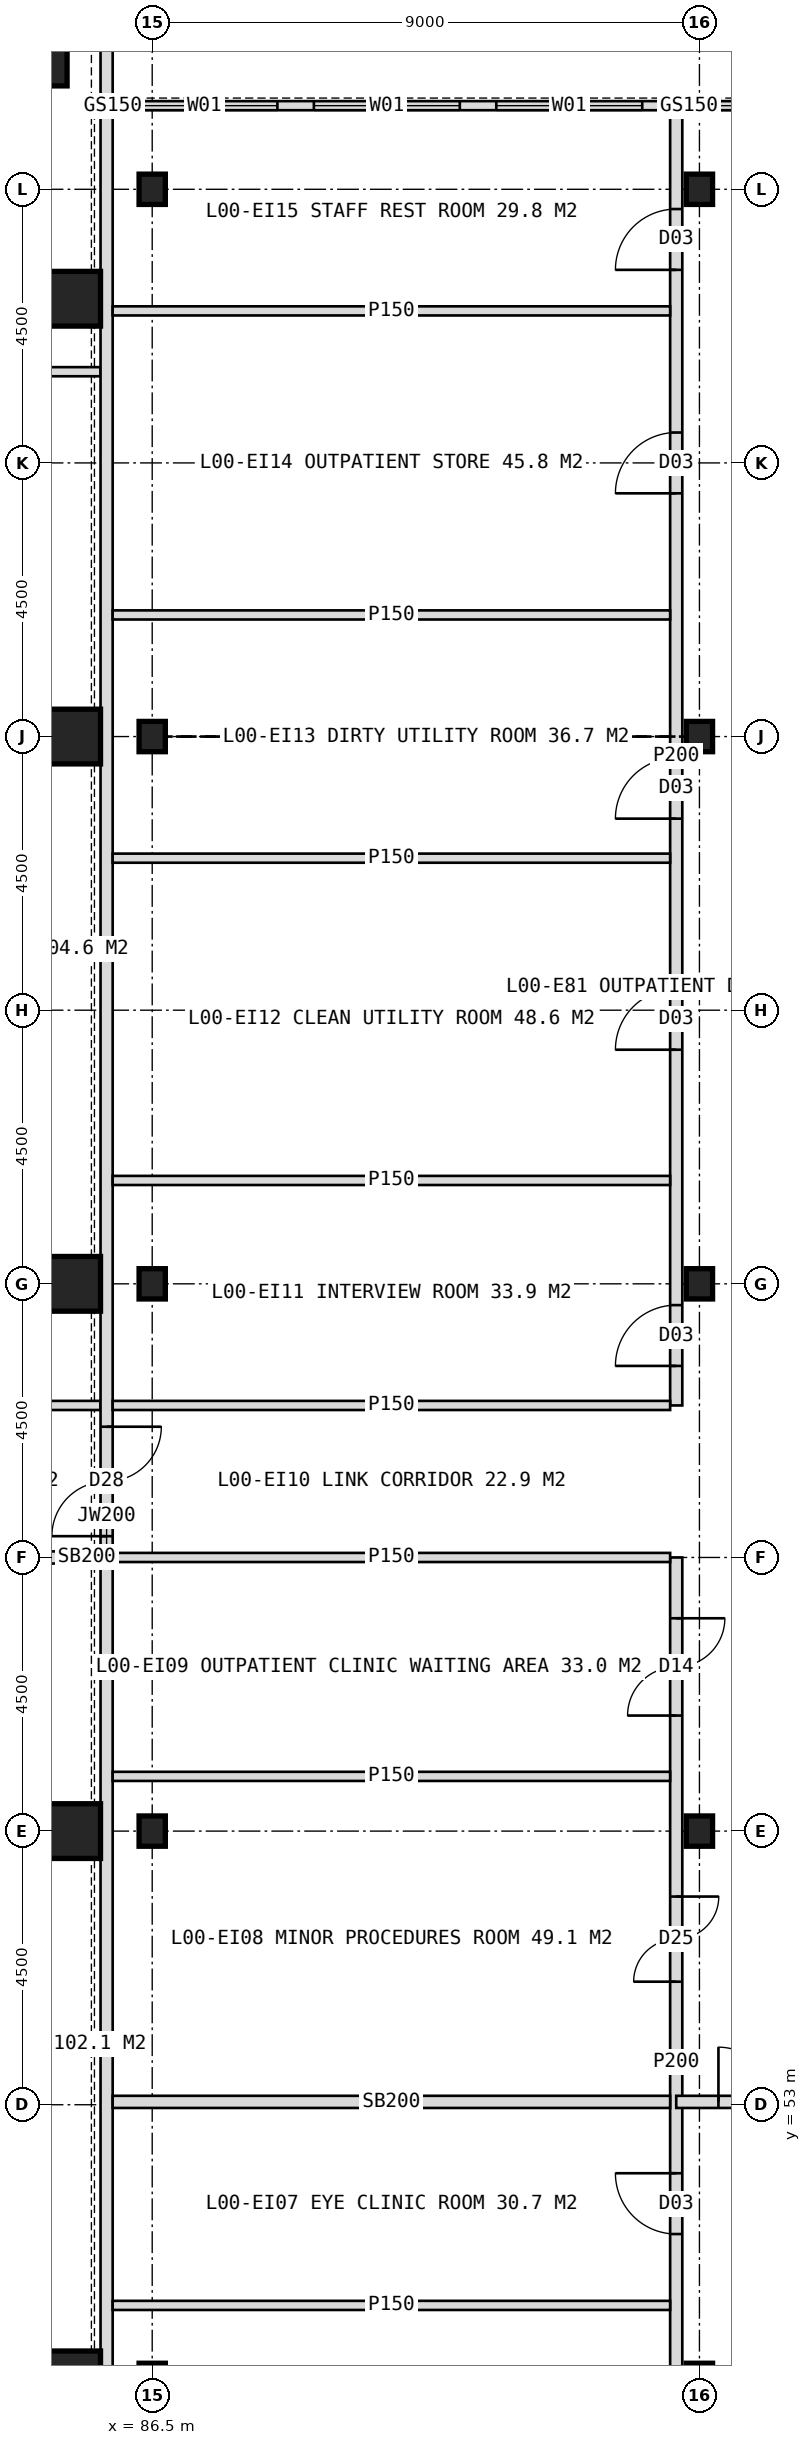
"""IFC4 building model, lengths in metres.
Left out: names, types, materials, properties, quantities, classifications, styles, units other than length and angle.
Written with IfcOpenShell. Run it as: python <this file> out.ifc"""

import sys

from ifc_helpers import new_model, si_unit, direction, frame, frame_2d, origin, origin_2d, place, context, subcontext, project, spatial, rectangle, hollow_rectangle, i_section, extrude, element, fill, save


model = new_model("IFC4")
c1 = context("Model", 3, precision=1e-05, world=origin(), true_north=direction((0.0, 1.0)))
c2 = subcontext(c1, "Body", "Model", "MODEL_VIEW")
j1 = project(units=[si_unit("LENGTHUNIT", "METRE"), si_unit("PLANEANGLEUNIT", "RADIAN")], contexts=[c1])
p1 = place(None, origin())
s1 = spatial("IfcSite", under=j1, at=p1, CompositionType="ELEMENT")
p2 = place(p1, origin())
s2 = spatial("IfcBuilding", under=s1, at=p2, CompositionType="ELEMENT")
p3 = place(p2, origin())
s3 = spatial("IfcBuildingStorey", under=s2, at=p3, CompositionType="ELEMENT", Elevation=0.0)
for number, where, z_axis, x_axis in (
    (1, (85.2, 48.5, 0.0), (0.0, 0.0, 1.0), (1.0, 0.0, 0.0)),
    (2, (85.2, 57.5, 0.0), (0.0, 0.0, 1.0), (1.0, 0.0, 0.0)),
    (3, (85.2, 66.5, 0.0), (0.0, 0.0, 1.0), (1.0, 0.0, 0.0)),
    (4, (85.2, 75.5, 0.0), (0.0, 0.0, 1.0), (1.0, 0.0, 0.0)),
    (5, (85.2, 82.7, 0.0), (0.0, 0.0, 1.0), (1.0, 0.0, 0.0)),
    (6, (84.65, 86.65, 0.0), (0.0, 0.0, 1.0), (1.0, 0.0, 0.0)),
):
    element("IfcColumn", number, at=place(p3, frame(where, z_axis=z_axis, x_axis=x_axis)), inside=s3, PredefinedType="COLUMN", context=c2, shape_type="SweptSolid", body=[
        extrude(hollow_rectangle(XDim=0.9, YDim=0.9, WallThickness=0.08, at=origin_2d()), origin(), (0.0, 0.0, 1.0), 6.0),
    ])
for number, where, z_axis, x_axis in (
    (7, (86.5, 48.5, 0.0), (0.0, 0.0, 1.0), (1.0, 0.0, 0.0)),
    (8, (86.5, 57.5, 0.0), (0.0, 0.0, 1.0), (1.0, 0.0, 0.0)),
    (9, (86.5, 66.5, 0.0), (0.0, 0.0, 1.0), (1.0, 0.0, 0.0)),
    (10, (86.5, 75.5, 0.0), (0.0, 0.0, 1.0), (1.0, 0.0, 0.0)),
    (11, (86.5, 84.5, 0.0), (0.0, 0.0, 1.0), (1.0, 0.0, 0.0)),
    (12, (95.5, 48.5, 0.0), (0.0, 0.0, 1.0), (1.0, 0.0, 0.0)),
    (13, (95.5, 57.5, 0.0), (0.0, 0.0, 1.0), (1.0, 0.0, 0.0)),
    (14, (95.5, 66.5, 0.0), (0.0, 0.0, 1.0), (1.0, 0.0, 0.0)),
    (15, (95.5, 75.5, 0.0), (0.0, 0.0, 1.0), (1.0, 0.0, 0.0)),
    (16, (95.5, 84.5, 0.0), (0.0, 0.0, 1.0), (1.0, 0.0, 0.0)),
):
    element("IfcColumn", number, at=place(p3, frame(where, z_axis=z_axis, x_axis=x_axis)), inside=s3, PredefinedType="COLUMN", context=c2, shape_type="SweptSolid", body=[
        extrude(i_section(OverallWidth=0.432, OverallDepth=0.498, WebThickness=0.056, FlangeThickness=0.089, FilletRadius=0.015, at=origin_2d()), origin(), (0.0, 0.0, 1.0), 6.0),
    ])
p4 = place(p3, frame((104.5, 85.875, 0.0), z_axis=(0.0, 0.0, 1.0), x_axis=(-1.0, 0.0, 0.0)))
e17 = element("IfcWall", 17, at=p4, inside=s3, PredefinedType="STANDARD", context=c2, shape_type="SweptSolid", body=[
    extrude(rectangle(XDim=18.341, YDim=0.15, at=frame_2d((9.17, 0.0))), origin(), (0.0, 0.0, 1.0), 5.1),
])
p5 = place(p4, frame((3.645, 0.0, 0.0)))
e18 = element("IfcOpeningElement", 18, at=p5, cuts=e17, PredefinedType="OPENING", context=c2, shape_type="SweptSolid", body=[
    extrude(rectangle(XDim=1.8, YDim=2.4, at=frame_2d((0.9, 1.2))), frame((0.0, 0.085, 0.0), z_axis=(0.0, -1.0, 0.0), x_axis=(1.0, 0.0, 0.0)), (0.0, 0.0, 1.0), 0.17),
])
p6 = place(p4, frame((0.152, 0.0, 0.6)))
e19 = element("IfcOpeningElement", 19, at=p6, cuts=e17, PredefinedType="OPENING", context=c2, shape_type="SweptSolid", body=[
    extrude(rectangle(XDim=2.4, YDim=3.0, at=frame_2d((1.2, 1.5))), frame((0.0, 0.085, 0.0), z_axis=(0.0, -1.0, 0.0), x_axis=(1.0, 0.0, 0.0)), (0.0, 0.0, 1.0), 0.17),
])
p7 = place(p4, frame((6.587, 0.0, 0.6)))
e20 = element("IfcOpeningElement", 20, at=p7, cuts=e17, PredefinedType="OPENING", context=c2, shape_type="SweptSolid", body=[
    extrude(rectangle(XDim=2.4, YDim=3.0, at=frame_2d((1.2, 1.5))), frame((0.0, 0.085, 0.0), z_axis=(0.0, -1.0, 0.0), x_axis=(1.0, 0.0, 0.0)), (0.0, 0.0, 1.0), 0.17),
])
p8 = place(p4, frame((9.941, 0.0, 0.6)))
e21 = element("IfcOpeningElement", 21, at=p8, cuts=e17, PredefinedType="OPENING", context=c2, shape_type="SweptSolid", body=[
    extrude(rectangle(XDim=2.4, YDim=3.0, at=frame_2d((1.2, 1.5))), frame((0.0, 0.085, 0.0), z_axis=(0.0, -1.0, 0.0), x_axis=(1.0, 0.0, 0.0)), (0.0, 0.0, 1.0), 0.17),
])
p9 = place(p4, frame((12.941, 0.0, 0.6)))
e22 = element("IfcOpeningElement", 22, at=p9, cuts=e17, PredefinedType="OPENING", context=c2, shape_type="SweptSolid", body=[
    extrude(rectangle(XDim=2.4, YDim=3.0, at=frame_2d((1.2, 1.5))), frame((0.0, 0.085, 0.0), z_axis=(0.0, -1.0, 0.0), x_axis=(1.0, 0.0, 0.0)), (0.0, 0.0, 1.0), 0.17),
])
p10 = place(p4, frame((15.941, 0.0, 0.6)))
e23 = element("IfcOpeningElement", 23, at=p10, cuts=e17, PredefinedType="OPENING", context=c2, shape_type="SweptSolid", body=[
    extrude(rectangle(XDim=2.4, YDim=3.0, at=frame_2d((1.2, 1.5))), frame((0.0, 0.085, 0.0), z_axis=(0.0, -1.0, 0.0), x_axis=(1.0, 0.0, 0.0)), (0.0, 0.0, 1.0), 0.17),
])
p11 = place(p3, frame((86.159, 85.875, 0.0), z_axis=(0.0, 0.0, 1.0), x_axis=(-1.0, 0.0, 0.0)))
e24 = element("IfcWall", 24, at=p11, inside=s3, PredefinedType="STANDARD", context=c2, shape_type="SweptSolid", body=[
    extrude(rectangle(XDim=0.609, YDim=0.15, at=frame_2d((0.304, 0.0))), origin(), (0.0, 0.0, 1.0), 6.0),
])
for number, where, z_axis, x_axis in (
    (25, (79.5, 81.5, 0.0), (0.0, 0.0, 1.0), (1.0, 0.0, 0.0)),
    (26, (79.5, 64.5, 0.0), (0.0, 0.0, 1.0), (1.0, 0.0, 0.0)),
):
    element("IfcWall", number, at=place(p3, frame(where, z_axis=z_axis, x_axis=x_axis)), inside=s3, PredefinedType="PARTITIONING", context=c2, shape_type="SweptSolid", body=[
        extrude(rectangle(XDim=6.15, YDim=0.15, at=frame_2d((3.075, 0.0))), origin(), (0.0, 0.0, 1.0), 5.7),
    ])
p12 = place(p3, frame((79.5, 62.0, 0.0), z_axis=(0.0, 0.0, 1.0), x_axis=(1.0, 0.0, 0.0)))
e27 = element("IfcWall", 27, at=p12, inside=s3, PredefinedType="SOLIDWALL", context=c2, shape_type="SweptSolid", body=[
    extrude(rectangle(XDim=5.7, YDim=0.2, at=frame_2d((2.85, 0.0))), origin(), (0.0, 0.0, 1.0), 4.9),
])
p13 = place(p3, frame((85.2, 62.0, 0.0), z_axis=(0.0, 0.0, 1.0), x_axis=(1.0, 0.0, 0.0)))
e28 = element("IfcWall", 28, at=p13, inside=s3, PredefinedType="SOLIDWALL", context=c2, shape_type="SweptSolid", body=[
    extrude(rectangle(XDim=0.45, YDim=0.2, at=frame_2d((0.225, 0.0))), origin(), (0.0, 0.0, 1.0), 5.7),
])
p14 = place(p3, frame((95.118, 45.4, 0.0), z_axis=(0.0, 0.0, 1.0), x_axis=(0.0, 1.0, 0.0)))
e29 = element("IfcWall", 29, at=p14, inside=s3, PredefinedType="PARTITIONING", context=c2, shape_type="SweptSolid", body=[
    extrude(rectangle(XDim=16.6, YDim=0.2, at=frame_2d((8.3, 0.0))), origin(), (0.0, 0.0, 1.0), 5.7),
])
p15 = place(p14, frame((1.65, 0.0, 0.0)))
e30 = element("IfcOpeningElement", 30, at=p15, cuts=e29, PredefinedType="OPENING", context=c2, shape_type="SweptSolid", body=[
    extrude(rectangle(XDim=1.0, YDim=2.1, at=frame_2d((0.5, 1.05))), frame((0.0, 0.11, 0.0), z_axis=(0.0, -1.0, 0.0), x_axis=(1.0, 0.0, 0.0)), (0.0, 0.0, 1.0), 0.22),
])
p16 = place(p14, frame((5.473, 0.0, 0.0)))
e31 = element("IfcOpeningElement", 31, at=p16, cuts=e29, PredefinedType="OPENING", context=c2, shape_type="SweptSolid", body=[
    extrude(rectangle(XDim=1.0, YDim=2.1, at=frame_2d((0.5, 1.05))), frame((0.0, 0.11, 0.0), z_axis=(0.0, -1.0, 0.0), x_axis=(1.0, 0.0, 0.0)), (0.0, 0.0, 1.0), 0.22),
])
p17 = place(p14, frame((9.624, 0.0, 0.0)))
e32 = element("IfcOpeningElement", 32, at=p17, cuts=e29, PredefinedType="OPENING", context=c2, shape_type="SweptSolid", body=[
    extrude(rectangle(XDim=1.4, YDim=2.2, at=frame_2d((0.7, 1.1))), frame((0.0, 0.11, 0.0), z_axis=(0.0, -1.0, 0.0), x_axis=(1.0, 0.0, 0.0)), (0.0, 0.0, 1.0), 0.22),
])
p18 = place(p14, frame((14.0, 0.0, 0.0)))
e33 = element("IfcOpeningElement", 33, at=p18, cuts=e29, PredefinedType="OPENING", context=c2, shape_type="SweptSolid", body=[
    extrude(rectangle(XDim=1.6, YDim=2.2, at=frame_2d((0.8, 1.1))), frame((0.0, 0.11, 0.0), z_axis=(0.0, -1.0, 0.0), x_axis=(1.0, 0.0, 0.0)), (0.0, 0.0, 1.0), 0.22),
])
p19 = place(p3, frame((95.118, 64.5, 0.0), z_axis=(0.0, 0.0, 1.0), x_axis=(0.0, 1.0, 0.0)))
e34 = element("IfcWall", 34, at=p19, inside=s3, PredefinedType="PARTITIONING", context=c2, shape_type="SweptSolid", body=[
    extrude(rectangle(XDim=21.35, YDim=0.2, at=frame_2d((10.675, 0.0))), origin(), (0.0, 0.0, 1.0), 5.7),
])
p20 = place(p19, frame((0.65, 0.0, 0.0)))
e35 = element("IfcOpeningElement", 35, at=p20, cuts=e34, PredefinedType="OPENING", context=c2, shape_type="SweptSolid", body=[
    extrude(rectangle(XDim=1.0, YDim=2.1, at=frame_2d((0.5, 1.05))), frame((0.0, 0.11, 0.0), z_axis=(0.0, -1.0, 0.0), x_axis=(1.0, 0.0, 0.0)), (0.0, 0.0, 1.0), 0.22),
])
p21 = place(p19, frame((5.85, 0.0, 0.0)))
e36 = element("IfcOpeningElement", 36, at=p21, cuts=e34, PredefinedType="OPENING", context=c2, shape_type="SweptSolid", body=[
    extrude(rectangle(XDim=1.0, YDim=2.1, at=frame_2d((0.5, 1.05))), frame((0.0, 0.11, 0.0), z_axis=(0.0, -1.0, 0.0), x_axis=(1.0, 0.0, 0.0)), (0.0, 0.0, 1.0), 0.22),
])
p22 = place(p19, frame((9.65, 0.0, 0.0)))
e37 = element("IfcOpeningElement", 37, at=p22, cuts=e34, PredefinedType="OPENING", context=c2, shape_type="SweptSolid", body=[
    extrude(rectangle(XDim=1.0, YDim=2.1, at=frame_2d((0.5, 1.05))), frame((0.0, 0.11, 0.0), z_axis=(0.0, -1.0, 0.0), x_axis=(1.0, 0.0, 0.0)), (0.0, 0.0, 1.0), 0.22),
])
p23 = place(p19, frame((15.0, 0.0, 0.0)))
e38 = element("IfcOpeningElement", 38, at=p23, cuts=e34, PredefinedType="OPENING", context=c2, shape_type="SweptSolid", body=[
    extrude(rectangle(XDim=1.0, YDim=2.1, at=frame_2d((0.5, 1.05))), frame((0.0, 0.11, 0.0), z_axis=(0.0, -1.0, 0.0), x_axis=(1.0, 0.0, 0.0)), (0.0, 0.0, 1.0), 0.22),
])
p24 = place(p19, frame((18.675, 0.0, 0.0)))
e39 = element("IfcOpeningElement", 39, at=p24, cuts=e34, PredefinedType="OPENING", context=c2, shape_type="SweptSolid", body=[
    extrude(rectangle(XDim=1.0, YDim=2.1, at=frame_2d((0.5, 1.05))), frame((0.0, 0.11, 0.0), z_axis=(0.0, -1.0, 0.0), x_axis=(1.0, 0.0, 0.0)), (0.0, 0.0, 1.0), 0.22),
])
p25 = place(p3, frame((98.307, 53.047, 0.0), z_axis=(0.0, 0.0, 1.0), x_axis=(-1.0, 0.0, 0.0)))
e40 = element("IfcWall", 40, at=p25, inside=s3, PredefinedType="SOLIDWALL", context=c2, shape_type="SweptSolid", body=[
    extrude(rectangle(XDim=3.189, YDim=0.2, at=frame_2d((1.594, 0.0))), origin(), (0.0, 0.0, 1.0), 5.7),
])
p26 = place(p25, frame((0.695, 0.0, 0.0)))
e41 = element("IfcOpeningElement", 41, at=p26, cuts=e40, PredefinedType="OPENING", context=c2, shape_type="SweptSolid", body=[
    extrude(rectangle(XDim=1.8, YDim=2.2, at=frame_2d((0.9, 1.1))), frame((0.0, 0.11, 0.0), z_axis=(0.0, -1.0, 0.0), x_axis=(1.0, 0.0, 0.0)), (0.0, 0.0, 1.0), 0.22),
])
p27 = place(p3, frame((85.75, 36.8, 0.0), z_axis=(0.0, 0.0, 1.0), x_axis=(0.0, 1.0, 0.0)))
e42 = element("IfcWall", 42, at=p27, inside=s3, PredefinedType="SOLIDWALL", context=c2, shape_type="SweptSolid", body=[
    extrude(rectangle(XDim=50.4, YDim=0.2, at=frame_2d((25.2, 0.0))), origin(), (0.0, 0.0, 1.0), 5.7),
])
p28 = place(p27, frame((6.25, 0.0, 0.0)))
e43 = element("IfcOpeningElement", 43, at=p28, cuts=e42, PredefinedType="OPENING", context=c2, shape_type="SweptSolid", body=[
    extrude(rectangle(XDim=1.8, YDim=2.2, at=frame_2d((0.9, 1.1))), frame((0.0, 0.11, 0.0), z_axis=(0.0, -1.0, 0.0), x_axis=(1.0, 0.0, 0.0)), (0.0, 0.0, 1.0), 0.22),
])
p29 = place(p27, frame((25.55, 0.0, 0.0)))
e44 = element("IfcOpeningElement", 44, at=p29, cuts=e42, PredefinedType="OPENING", context=c2, shape_type="SweptSolid", body=[
    extrude(rectangle(XDim=1.8, YDim=2.2, at=frame_2d((0.9, 1.1))), frame((0.0, 0.11, 0.0), z_axis=(0.0, -1.0, 0.0), x_axis=(1.0, 0.0, 0.0)), (0.0, 0.0, 1.0), 0.22),
])
p30 = place(p3, frame((95.018, 49.7, 0.0), z_axis=(0.0, 0.0, 1.0), x_axis=(-1.0, 0.0, 0.0)))
e45 = element("IfcWall", 45, at=p30, inside=s3, PredefinedType="PARTITIONING", context=c2, shape_type="SweptSolid", body=[
    extrude(rectangle(XDim=9.168, YDim=0.15, at=frame_2d((4.584, 0.0))), origin(), (0.0, 0.0, 1.0), 5.7),
])
p31 = place(p3, frame((95.018, 53.047, 0.0), z_axis=(0.0, 0.0, 1.0), x_axis=(-1.0, 0.0, 0.0)))
e46 = element("IfcWall", 46, at=p31, inside=s3, PredefinedType="SOLIDWALL", context=c2, shape_type="SweptSolid", body=[
    extrude(rectangle(XDim=9.168, YDim=0.2, at=frame_2d((4.584, 0.0))), origin(), (0.0, 0.0, 1.0), 5.7),
])
for number, where, z_axis, x_axis in (
    (47, (95.018, 58.4, 0.0), (0.0, 0.0, 1.0), (-1.0, 0.0, 0.0)),
    (48, (95.018, 62.0, 0.0), (0.0, 0.0, 1.0), (-1.0, 0.0, 0.0)),
    (49, (95.018, 64.5, 0.0), (0.0, 0.0, 1.0), (-1.0, 0.0, 0.0)),
    (50, (95.018, 68.2, 0.0), (0.0, 0.0, 1.0), (-1.0, 0.0, 0.0)),
    (51, (95.018, 73.5, 0.0), (0.0, 0.0, 1.0), (-1.0, 0.0, 0.0)),
    (52, (95.018, 77.5, 0.0), (0.0, 0.0, 1.0), (-1.0, 0.0, 0.0)),
    (53, (95.018, 82.5, 0.0), (0.0, 0.0, 1.0), (-1.0, 0.0, 0.0)),
):
    element("IfcWall", number, at=place(p3, frame(where, z_axis=z_axis, x_axis=x_axis)), inside=s3, PredefinedType="PARTITIONING", context=c2, shape_type="SweptSolid", body=[
        extrude(rectangle(XDim=9.168, YDim=0.15, at=frame_2d((4.584, 0.0))), origin(), (0.0, 0.0, 1.0), 5.7),
    ])
p32 = place(p7, origin())
e54 = element("IfcWindow", 54, at=p32, inside=s3, PartitioningType="SINGLE_PANEL", PredefinedType="WINDOW", context=c2, shape_type="SweptSolid", body=[
    extrude(rectangle(XDim=2.4, YDim=3.0, at=frame_2d((1.2, 1.5))), frame((0.0, 0.03, 0.0), z_axis=(0.0, -1.0, 0.0), x_axis=(1.0, 0.0, 0.0)), (0.0, 0.0, 1.0), 0.06),
])
fill(e20, e54)
p33 = place(p8, origin())
e55 = element("IfcWindow", 55, at=p33, inside=s3, PartitioningType="SINGLE_PANEL", PredefinedType="WINDOW", context=c2, shape_type="SweptSolid", body=[
    extrude(rectangle(XDim=2.4, YDim=3.0, at=frame_2d((1.2, 1.5))), frame((0.0, 0.03, 0.0), z_axis=(0.0, -1.0, 0.0), x_axis=(1.0, 0.0, 0.0)), (0.0, 0.0, 1.0), 0.06),
])
fill(e21, e55)
p34 = place(p9, origin())
e56 = element("IfcWindow", 56, at=p34, inside=s3, PartitioningType="SINGLE_PANEL", PredefinedType="WINDOW", context=c2, shape_type="SweptSolid", body=[
    extrude(rectangle(XDim=2.4, YDim=3.0, at=frame_2d((1.2, 1.5))), frame((0.0, 0.03, 0.0), z_axis=(0.0, -1.0, 0.0), x_axis=(1.0, 0.0, 0.0)), (0.0, 0.0, 1.0), 0.06),
])
fill(e22, e56)
p35 = place(p10, origin())
e57 = element("IfcWindow", 57, at=p35, inside=s3, PartitioningType="SINGLE_PANEL", PredefinedType="WINDOW", context=c2, shape_type="SweptSolid", body=[
    extrude(rectangle(XDim=2.4, YDim=3.0, at=frame_2d((1.2, 1.5))), frame((0.0, 0.03, 0.0), z_axis=(0.0, -1.0, 0.0), x_axis=(1.0, 0.0, 0.0)), (0.0, 0.0, 1.0), 0.06),
])
fill(e23, e57)
p36 = place(p26, origin())
e58 = element("IfcDoor", 58, at=p36, inside=s3, OperationType="DOUBLE_DOOR_DOUBLE_SWING", PredefinedType="DOOR", context=c2, shape_type="SweptSolid", body=[
    extrude(rectangle(XDim=1.8, YDim=2.2, at=frame_2d((0.9, 1.1))), frame((0.0, 0.025, 0.0), z_axis=(0.0, -1.0, 0.0), x_axis=(1.0, 0.0, 0.0)), (0.0, 0.0, 1.0), 0.05),
])
fill(e41, e58)
p37 = place(p29, origin())
e59 = element("IfcDoor", 59, at=p37, inside=s3, OperationType="DOUBLE_DOOR_SINGLE_SWING", PredefinedType="DOOR", context=c2, shape_type="SweptSolid", body=[
    extrude(rectangle(XDim=1.8, YDim=2.2, at=frame_2d((0.9, 1.1))), frame((0.0, 0.025, 0.0), z_axis=(0.0, -1.0, 0.0), x_axis=(1.0, 0.0, 0.0)), (0.0, 0.0, 1.0), 0.05),
])
fill(e44, e59)
p38 = place(p16, origin())
e60 = element("IfcDoor", 60, at=p38, inside=s3, OperationType="SINGLE_SWING_RIGHT", PredefinedType="DOOR", context=c2, shape_type="SweptSolid", body=[
    extrude(rectangle(XDim=1.0, YDim=2.1, at=frame_2d((0.5, 1.05))), frame((0.0, 0.025, 0.0), z_axis=(0.0, -1.0, 0.0), x_axis=(1.0, 0.0, 0.0)), (0.0, 0.0, 1.0), 0.05),
])
fill(e31, e60)
p39 = place(p17, origin())
e61 = element("IfcDoor", 61, at=p39, inside=s3, OperationType="DOUBLE_DOOR_SINGLE_SWING", PredefinedType="DOOR", context=c2, shape_type="SweptSolid", body=[
    extrude(rectangle(XDim=1.4, YDim=2.2, at=frame_2d((0.7, 1.1))), frame((0.0, 0.025, 0.0), z_axis=(0.0, -1.0, 0.0), x_axis=(1.0, 0.0, 0.0)), (0.0, 0.0, 1.0), 0.05),
])
fill(e32, e61)
p40 = place(p18, origin())
e62 = element("IfcDoor", 62, at=p40, inside=s3, OperationType="DOUBLE_DOOR_DOUBLE_SWING", PredefinedType="DOOR", context=c2, shape_type="SweptSolid", body=[
    extrude(rectangle(XDim=1.6, YDim=2.2, at=frame_2d((0.8, 1.1))), frame((0.0, 0.025, 0.0), z_axis=(0.0, -1.0, 0.0), x_axis=(1.0, 0.0, 0.0)), (0.0, 0.0, 1.0), 0.05),
])
fill(e33, e62)
p41 = place(p20, origin())
e63 = element("IfcDoor", 63, at=p41, inside=s3, OperationType="SINGLE_SWING_LEFT", PredefinedType="DOOR", context=c2, shape_type="SweptSolid", body=[
    extrude(rectangle(XDim=1.0, YDim=2.1, at=frame_2d((0.5, 1.05))), frame((0.0, 0.025, 0.0), z_axis=(0.0, -1.0, 0.0), x_axis=(1.0, 0.0, 0.0)), (0.0, 0.0, 1.0), 0.05),
])
fill(e35, e63)
p42 = place(p21, origin())
e64 = element("IfcDoor", 64, at=p42, inside=s3, OperationType="SINGLE_SWING_LEFT", PredefinedType="DOOR", context=c2, shape_type="SweptSolid", body=[
    extrude(rectangle(XDim=1.0, YDim=2.1, at=frame_2d((0.5, 1.05))), frame((0.0, 0.025, 0.0), z_axis=(0.0, -1.0, 0.0), x_axis=(1.0, 0.0, 0.0)), (0.0, 0.0, 1.0), 0.05),
])
fill(e36, e64)
p43 = place(p22, origin())
e65 = element("IfcDoor", 65, at=p43, inside=s3, OperationType="SINGLE_SWING_LEFT", PredefinedType="DOOR", context=c2, shape_type="SweptSolid", body=[
    extrude(rectangle(XDim=1.0, YDim=2.1, at=frame_2d((0.5, 1.05))), frame((0.0, 0.025, 0.0), z_axis=(0.0, -1.0, 0.0), x_axis=(1.0, 0.0, 0.0)), (0.0, 0.0, 1.0), 0.05),
])
fill(e37, e65)
p44 = place(p23, origin())
e66 = element("IfcDoor", 66, at=p44, inside=s3, OperationType="SINGLE_SWING_LEFT", PredefinedType="DOOR", context=c2, shape_type="SweptSolid", body=[
    extrude(rectangle(XDim=1.0, YDim=2.1, at=frame_2d((0.5, 1.05))), frame((0.0, 0.025, 0.0), z_axis=(0.0, -1.0, 0.0), x_axis=(1.0, 0.0, 0.0)), (0.0, 0.0, 1.0), 0.05),
])
fill(e38, e66)
p45 = place(p24, origin())
e67 = element("IfcDoor", 67, at=p45, inside=s3, OperationType="SINGLE_SWING_LEFT", PredefinedType="DOOR", context=c2, shape_type="SweptSolid", body=[
    extrude(rectangle(XDim=1.0, YDim=2.1, at=frame_2d((0.5, 1.05))), frame((0.0, 0.025, 0.0), z_axis=(0.0, -1.0, 0.0), x_axis=(1.0, 0.0, 0.0)), (0.0, 0.0, 1.0), 0.05),
])
fill(e39, e67)
save(model, sys.argv[1])
